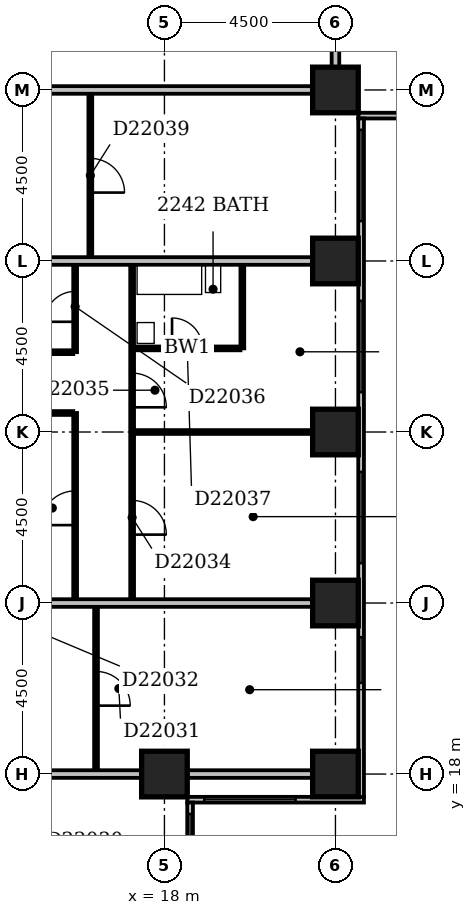
"""IFC4 building model, lengths in metres.
Left out: names, types, materials, properties, quantities, classifications, styles, units other than length and angle.
Written with IfcOpenShell. Run it as: python <this file> out.ifc"""

import sys

from ifc_helpers import new_model, si_unit, direction, frame, frame_2d, origin, origin_2d, place, context, subcontext, project, spatial, rectangle, extrude, element, fill, save


model = new_model("IFC4")
c1 = context("Model", 3, precision=1e-05, world=origin(), true_north=direction((0.0, 1.0)))
c2 = subcontext(c1, "Body", "Model", "MODEL_VIEW")
j1 = project(units=[si_unit("LENGTHUNIT", "METRE"), si_unit("PLANEANGLEUNIT", "RADIAN")], contexts=[c1])
p1 = place(None, origin())
s1 = spatial("IfcSite", under=j1, at=p1, CompositionType="ELEMENT")
p2 = place(p1, origin())
s2 = spatial("IfcBuilding", under=s1, at=p2, CompositionType="ELEMENT")
p3 = place(p2, frame((0.0, 0.0, 90.2)))
s3 = spatial("IfcBuildingStorey", under=s2, at=p3, CompositionType="ELEMENT", Elevation=90.2)
for number, where, z_axis, x_axis in (
    (1, (18.0, 18.0, -0.3), (0.0, 0.0, 1.0), (1.0, 0.0, 0.0)),
    (2, (22.5, 18.0, -0.3), (0.0, 0.0, 1.0), (1.0, 0.0, 0.0)),
    (3, (22.5, 22.5, -0.3), (0.0, 0.0, 1.0), (1.0, 0.0, 0.0)),
    (4, (22.5, 27.0, -0.3), (0.0, 0.0, 1.0), (1.0, 0.0, 0.0)),
    (5, (22.5, 31.5, -0.3), (0.0, 0.0, 1.0), (1.0, 0.0, 0.0)),
    (6, (22.5, 36.0, -0.3), (0.0, 0.0, 1.0), (1.0, 0.0, 0.0)),
):
    element("IfcColumn", number, at=place(p3, frame(where, z_axis=z_axis, x_axis=x_axis)), inside=s3, PredefinedType="COLUMN", context=c2, shape_type="SweptSolid", body=[
        extrude(rectangle(XDim=1.2, YDim=1.2, at=origin_2d()), origin(), (0.0, 0.0, 1.0), 3.6),
    ])
p4 = place(p3, frame((18.675, 8.4, 0.0), z_axis=(0.0, 0.0, 1.0), x_axis=(0.0, 1.0, 0.0)))
e7 = element("IfcWall", 7, at=p4, inside=s3, PredefinedType="STANDARD", context=c2, shape_type="SweptSolid", body=[
    extrude(rectangle(XDim=8.85, YDim=0.15, at=frame_2d((4.425, 0.0))), origin(), (0.0, 0.0, 1.0), 2.7),
])
p5 = place(p4, frame((1.864, 0.0, 0.6)))
e8 = element("IfcOpeningElement", 8, at=p5, cuts=e7, PredefinedType="OPENING", context=c2, shape_type="SweptSolid", body=[
    extrude(rectangle(XDim=2.4, YDim=1.8, at=frame_2d((1.2, 0.9))), frame((0.0, 0.087, 0.0), z_axis=(0.0, -1.0, 0.0), x_axis=(1.0, 0.0, 0.0)), (0.0, 0.0, 1.0), 0.174),
])
p6 = place(p4, frame((6.15, 0.0, 0.6)))
e9 = element("IfcOpeningElement", 9, at=p6, cuts=e7, PredefinedType="OPENING", context=c2, shape_type="SweptSolid", body=[
    extrude(rectangle(XDim=2.4, YDim=1.8, at=frame_2d((1.2, 0.9))), frame((0.0, 0.087, 0.0), z_axis=(0.0, -1.0, 0.0), x_axis=(1.0, 0.0, 0.0)), (0.0, 0.0, 1.0), 0.174),
])
p7 = place(p3, frame((18.6, 17.325, 0.0), z_axis=(0.0, 0.0, 1.0), x_axis=(1.0, 0.0, 0.0)))
e10 = element("IfcWall", 10, at=p7, inside=s3, PredefinedType="STANDARD", context=c2, shape_type="SweptSolid", body=[
    extrude(rectangle(XDim=4.65, YDim=0.15, at=frame_2d((2.325, 0.0))), origin(), (0.0, 0.0, 1.0), 2.7),
])
p8 = place(p7, frame((0.45, 0.0, 0.6)))
e11 = element("IfcOpeningElement", 11, at=p8, cuts=e10, PredefinedType="OPENING", context=c2, shape_type="SweptSolid", body=[
    extrude(rectangle(XDim=2.4, YDim=1.8, at=frame_2d((1.2, 0.9))), frame((0.0, 0.087, 0.0), z_axis=(0.0, -1.0, 0.0), x_axis=(1.0, 0.0, 0.0)), (0.0, 0.0, 1.0), 0.174),
])
p9 = place(p3, frame((23.175, 17.4, 0.0), z_axis=(0.0, 0.0, 1.0), x_axis=(0.0, 1.0, 0.0)))
e12 = element("IfcWall", 12, at=p9, inside=s3, PredefinedType="STANDARD", context=c2, shape_type="SweptSolid", body=[
    extrude(rectangle(XDim=17.85, YDim=0.15, at=frame_2d((8.925, 0.0))), origin(), (0.0, 0.0, 1.0), 2.7),
])
p10 = place(p9, frame((3.0, 0.0, 0.6)))
e13 = element("IfcOpeningElement", 13, at=p10, cuts=e12, PredefinedType="OPENING", context=c2, shape_type="SweptSolid", body=[
    extrude(rectangle(XDim=1.2, YDim=1.8, at=frame_2d((0.6, 0.9))), frame((0.0, 0.087, 0.0), z_axis=(0.0, -1.0, 0.0), x_axis=(1.0, 0.0, 0.0)), (0.0, 0.0, 1.0), 0.174),
])
p11 = place(p9, frame((6.15, 0.0, 0.6)))
e14 = element("IfcOpeningElement", 14, at=p11, cuts=e12, PredefinedType="OPENING", context=c2, shape_type="SweptSolid", body=[
    extrude(rectangle(XDim=2.4, YDim=1.8, at=frame_2d((1.2, 0.9))), frame((0.0, 0.087, 0.0), z_axis=(0.0, -1.0, 0.0), x_axis=(1.0, 0.0, 0.0)), (0.0, 0.0, 1.0), 0.174),
])
p12 = place(p9, frame((10.65, 0.0, 0.6)))
e15 = element("IfcOpeningElement", 15, at=p12, cuts=e12, PredefinedType="OPENING", context=c2, shape_type="SweptSolid", body=[
    extrude(rectangle(XDim=2.4, YDim=1.8, at=frame_2d((1.2, 0.9))), frame((0.0, 0.087, 0.0), z_axis=(0.0, -1.0, 0.0), x_axis=(1.0, 0.0, 0.0)), (0.0, 0.0, 1.0), 0.174),
])
p13 = place(p9, frame((15.15, 0.0, 0.6)))
e16 = element("IfcOpeningElement", 16, at=p13, cuts=e12, PredefinedType="OPENING", context=c2, shape_type="SweptSolid", body=[
    extrude(rectangle(XDim=2.4, YDim=1.8, at=frame_2d((1.2, 0.9))), frame((0.0, 0.087, 0.0), z_axis=(0.0, -1.0, 0.0), x_axis=(1.0, 0.0, 0.0)), (0.0, 0.0, 1.0), 0.174),
])
p14 = place(p3, frame((23.1, 35.325, 0.0), z_axis=(0.0, 0.0, 1.0), x_axis=(1.0, 0.0, 0.0)))
e17 = element("IfcWall", 17, at=p14, inside=s3, PredefinedType="STANDARD", context=c2, shape_type="SweptSolid", body=[
    extrude(rectangle(XDim=45.15, YDim=0.15, at=frame_2d((22.575, 0.0))), origin(), (0.0, 0.0, 1.0), 2.7),
])
p15 = place(p14, frame((2.185, 0.0, 0.6)))
e18 = element("IfcOpeningElement", 18, at=p15, cuts=e17, PredefinedType="OPENING", context=c2, shape_type="SweptSolid", body=[
    extrude(rectangle(XDim=0.9, YDim=1.8, at=frame_2d((0.45, 0.9))), frame((0.0, 0.087, 0.0), z_axis=(0.0, -1.0, 0.0), x_axis=(1.0, 0.0, 0.0)), (0.0, 0.0, 1.0), 0.174),
])
p16 = place(p14, frame((4.95, 0.0, 0.6)))
e19 = element("IfcOpeningElement", 19, at=p16, cuts=e17, PredefinedType="OPENING", context=c2, shape_type="SweptSolid", body=[
    extrude(rectangle(XDim=2.4, YDim=1.8, at=frame_2d((1.2, 0.9))), frame((0.0, 0.087, 0.0), z_axis=(0.0, -1.0, 0.0), x_axis=(1.0, 0.0, 0.0)), (0.0, 0.0, 1.0), 0.174),
])
p17 = place(p14, frame((9.45, 0.0, 0.6)))
e20 = element("IfcOpeningElement", 20, at=p17, cuts=e17, PredefinedType="OPENING", context=c2, shape_type="SweptSolid", body=[
    extrude(rectangle(XDim=2.4, YDim=1.8, at=frame_2d((1.2, 0.9))), frame((0.0, 0.087, 0.0), z_axis=(0.0, -1.0, 0.0), x_axis=(1.0, 0.0, 0.0)), (0.0, 0.0, 1.0), 0.174),
])
p18 = place(p14, frame((13.95, 0.0, 0.6)))
e21 = element("IfcOpeningElement", 21, at=p18, cuts=e17, PredefinedType="OPENING", context=c2, shape_type="SweptSolid", body=[
    extrude(rectangle(XDim=2.4, YDim=1.8, at=frame_2d((1.2, 0.9))), frame((0.0, 0.087, 0.0), z_axis=(0.0, -1.0, 0.0), x_axis=(1.0, 0.0, 0.0)), (0.0, 0.0, 1.0), 0.174),
])
p19 = place(p14, frame((18.45, 0.0, 0.6)))
e22 = element("IfcOpeningElement", 22, at=p19, cuts=e17, PredefinedType="OPENING", context=c2, shape_type="SweptSolid", body=[
    extrude(rectangle(XDim=2.4, YDim=1.8, at=frame_2d((1.2, 0.9))), frame((0.0, 0.087, 0.0), z_axis=(0.0, -1.0, 0.0), x_axis=(1.0, 0.0, 0.0)), (0.0, 0.0, 1.0), 0.174),
])
p20 = place(p14, frame((22.71, 0.0, 0.6)))
e23 = element("IfcOpeningElement", 23, at=p20, cuts=e17, PredefinedType="OPENING", context=c2, shape_type="SweptSolid", body=[
    extrude(rectangle(XDim=1.8, YDim=1.8, at=frame_2d((0.9, 0.9))), frame((0.0, 0.087, 0.0), z_axis=(0.0, -1.0, 0.0), x_axis=(1.0, 0.0, 0.0)), (0.0, 0.0, 1.0), 0.174),
])
p21 = place(p14, frame((28.861, 0.0, 0.6)))
e24 = element("IfcOpeningElement", 24, at=p21, cuts=e17, PredefinedType="OPENING", context=c2, shape_type="SweptSolid", body=[
    extrude(rectangle(XDim=1.2, YDim=1.8, at=frame_2d((0.6, 0.9))), frame((0.0, 0.087, 0.0), z_axis=(0.0, -1.0, 0.0), x_axis=(1.0, 0.0, 0.0)), (0.0, 0.0, 1.0), 0.174),
])
p22 = place(p14, frame((31.95, 0.0, 0.6)))
e25 = element("IfcOpeningElement", 25, at=p22, cuts=e17, PredefinedType="OPENING", context=c2, shape_type="SweptSolid", body=[
    extrude(rectangle(XDim=2.4, YDim=1.8, at=frame_2d((1.2, 0.9))), frame((0.0, 0.087, 0.0), z_axis=(0.0, -1.0, 0.0), x_axis=(1.0, 0.0, 0.0)), (0.0, 0.0, 1.0), 0.174),
])
p23 = place(p14, frame((36.45, 0.0, 0.6)))
e26 = element("IfcOpeningElement", 26, at=p23, cuts=e17, PredefinedType="OPENING", context=c2, shape_type="SweptSolid", body=[
    extrude(rectangle(XDim=2.4, YDim=1.8, at=frame_2d((1.2, 0.9))), frame((0.0, 0.087, 0.0), z_axis=(0.0, -1.0, 0.0), x_axis=(1.0, 0.0, 0.0)), (0.0, 0.0, 1.0), 0.174),
])
p24 = place(p14, frame((40.95, 0.0, 0.6)))
e27 = element("IfcOpeningElement", 27, at=p24, cuts=e17, PredefinedType="OPENING", context=c2, shape_type="SweptSolid", body=[
    extrude(rectangle(XDim=2.4, YDim=1.8, at=frame_2d((1.2, 0.9))), frame((0.0, 0.087, 0.0), z_axis=(0.0, -1.0, 0.0), x_axis=(1.0, 0.0, 0.0)), (0.0, 0.0, 1.0), 0.174),
])
p25 = place(p3, frame((9.1, 18.0, 0.0), z_axis=(0.0, 0.0, 1.0), x_axis=(1.0, 0.0, 0.0)))
e28 = element("IfcWall", 28, at=p25, inside=s3, PredefinedType="PARTITIONING", context=c2, shape_type="SweptSolid", body=[
    extrude(rectangle(XDim=8.3, YDim=0.2, at=frame_2d((4.15, 0.0))), origin(), (0.0, 0.0, 1.0), 2.6),
])
p26 = place(p3, frame((18.6, 18.0, 0.0), z_axis=(0.0, 0.0, 1.0), x_axis=(1.0, 0.0, 0.0)))
e29 = element("IfcWall", 29, at=p26, inside=s3, PredefinedType="PARTITIONING", context=c2, shape_type="SweptSolid", body=[
    extrude(rectangle(XDim=3.3, YDim=0.2, at=frame_2d((1.65, 0.0))), origin(), (0.0, 0.0, 1.0), 2.7),
])
p27 = place(p3, frame((16.2, 18.1, 0.0), z_axis=(0.0, 0.0, 1.0), x_axis=(0.0, 1.0, 0.0)))
e30 = element("IfcWall", 30, at=p27, inside=s3, PredefinedType="PARTITIONING", context=c2, shape_type="SweptSolid", body=[
    extrude(rectangle(XDim=4.3, YDim=0.1, at=frame_2d((2.15, 0.0))), origin(), (0.0, 0.0, 1.0), 3.3),
])
p28 = place(p27, frame((1.7, 0.0, 0.0)))
e31 = element("IfcOpeningElement", 31, at=p28, cuts=e30, PredefinedType="OPENING", context=c2, shape_type="SweptSolid", body=[
    extrude(rectangle(XDim=0.9, YDim=2.1, at=frame_2d((0.45, 1.05))), frame((0.0, 0.062, 0.0), z_axis=(0.0, -1.0, 0.0), x_axis=(1.0, 0.0, 0.0)), (0.0, 0.0, 1.0), 0.124),
])
p29 = place(p3, frame((9.1, 22.5, 0.0), z_axis=(0.0, 0.0, 1.0), x_axis=(1.0, 0.0, 0.0)))
e32 = element("IfcWall", 32, at=p29, inside=s3, PredefinedType="PARTITIONING", context=c2, shape_type="SweptSolid", body=[
    extrude(rectangle(XDim=12.8, YDim=0.2, at=frame_2d((6.4, 0.0))), origin(), (0.0, 0.0, 1.0), 3.3),
])
p30 = place(p3, frame((15.65, 22.6, 0.0), z_axis=(0.0, 0.0, 1.0), x_axis=(0.0, 1.0, 0.0)))
e33 = element("IfcWall", 33, at=p30, inside=s3, PredefinedType="PARTITIONING", context=c2, shape_type="SweptSolid", body=[
    extrude(rectangle(XDim=4.9, YDim=0.1, at=frame_2d((2.45, 0.0))), origin(), (0.0, 0.0, 1.0), 3.3),
])
p31 = place(p30, frame((1.95, 0.0, 0.0)))
e34 = element("IfcOpeningElement", 34, at=p31, cuts=e33, PredefinedType="OPENING", context=c2, shape_type="SweptSolid", body=[
    extrude(rectangle(XDim=0.9, YDim=2.1, at=frame_2d((0.45, 1.05))), frame((0.0, 0.062, 0.0), z_axis=(0.0, -1.0, 0.0), x_axis=(1.0, 0.0, 0.0)), (0.0, 0.0, 1.0), 0.124),
])
p32 = place(p3, frame((17.15, 22.6, 0.0), z_axis=(0.0, 0.0, 1.0), x_axis=(0.0, 1.0, 0.0)))
e35 = element("IfcWall", 35, at=p32, inside=s3, PredefinedType="PARTITIONING", context=c2, shape_type="SweptSolid", body=[
    extrude(rectangle(XDim=8.8, YDim=0.1, at=frame_2d((4.4, 0.0))), origin(), (0.0, 0.0, 1.0), 3.3),
])
p33 = place(p32, frame((1.7, 0.0, 0.0)))
e36 = element("IfcOpeningElement", 36, at=p33, cuts=e35, PredefinedType="OPENING", context=c2, shape_type="SweptSolid", body=[
    extrude(rectangle(XDim=0.9, YDim=2.1, at=frame_2d((0.45, 1.05))), frame((0.0, 0.062, 0.0), z_axis=(0.0, -1.0, 0.0), x_axis=(1.0, 0.0, 0.0)), (0.0, 0.0, 1.0), 0.124),
])
p34 = place(p32, frame((5.05, 0.0, 0.0)))
e37 = element("IfcOpeningElement", 37, at=p34, cuts=e35, PredefinedType="OPENING", context=c2, shape_type="SweptSolid", body=[
    extrude(rectangle(XDim=0.9, YDim=2.1, at=frame_2d((0.45, 1.05))), frame((0.0, 0.062, 0.0), z_axis=(0.0, -1.0, 0.0), x_axis=(1.0, 0.0, 0.0)), (0.0, 0.0, 1.0), 0.124),
])
p35 = place(p3, frame((17.2, 27.0, 0.0), z_axis=(0.0, 0.0, 1.0), x_axis=(1.0, 0.0, 0.0)))
e38 = element("IfcWall", 38, at=p35, inside=s3, PredefinedType="PARTITIONING", context=c2, shape_type="SweptSolid", body=[
    extrude(rectangle(XDim=4.7, YDim=0.1, at=frame_2d((2.35, 0.0))), origin(), (0.0, 0.0, 1.0), 2.7),
])
p36 = place(p3, frame((9.1, 27.5, 0.0), z_axis=(0.0, 0.0, 1.0), x_axis=(1.0, 0.0, 0.0)))
e39 = element("IfcWall", 39, at=p36, inside=s3, PredefinedType="PARTITIONING", context=c2, shape_type="SweptSolid", body=[
    extrude(rectangle(XDim=6.5, YDim=0.1, at=frame_2d((3.25, 0.0))), origin(), (0.0, 0.0, 1.0), 2.7),
])
p37 = place(p3, frame((9.1, 29.1, 0.0), z_axis=(0.0, 0.0, 1.0), x_axis=(1.0, 0.0, 0.0)))
e40 = element("IfcWall", 40, at=p37, inside=s3, PredefinedType="PLUMBINGWALL", context=c2, shape_type="SweptSolid", body=[
    extrude(rectangle(XDim=6.5, YDim=0.1, at=frame_2d((3.25, 0.0))), origin(), (0.0, 0.0, 1.0), 3.3),
])
p38 = place(p3, frame((15.65, 29.1, 0.0), z_axis=(0.0, 0.0, 1.0), x_axis=(0.0, 1.0, 0.0)))
e41 = element("IfcWall", 41, at=p38, inside=s3, PredefinedType="PARTITIONING", context=c2, shape_type="SweptSolid", body=[
    extrude(rectangle(XDim=2.3, YDim=0.1, at=frame_2d((1.15, 0.0))), origin(), (0.0, 0.0, 1.0), 3.3),
])
p39 = place(p38, frame((0.8, 0.0, 0.0)))
e42 = element("IfcOpeningElement", 42, at=p39, cuts=e41, PredefinedType="OPENING", context=c2, shape_type="SweptSolid", body=[
    extrude(rectangle(XDim=0.8, YDim=2.1, at=frame_2d((0.4, 1.05))), frame((0.0, 0.062, 0.0), z_axis=(0.0, -1.0, 0.0), x_axis=(1.0, 0.0, 0.0)), (0.0, 0.0, 1.0), 0.124),
])
p40 = place(p3, frame((17.2, 29.2, 0.0), z_axis=(0.0, 0.0, 1.0), x_axis=(1.0, 0.0, 0.0)))
e43 = element("IfcWall", 43, at=p40, inside=s3, PredefinedType="PLUMBINGWALL", context=c2, shape_type="SweptSolid", body=[
    extrude(rectangle(XDim=2.8, YDim=0.1, at=frame_2d((1.4, 0.0))), origin(), (0.0, 0.0, 1.0), 3.3),
])
p41 = place(p40, frame((1.0, 0.0, 0.0)))
e44 = element("IfcOpeningElement", 44, at=p41, cuts=e43, PredefinedType="OPENING", context=c2, shape_type="SweptSolid", body=[
    extrude(rectangle(XDim=0.8, YDim=2.1, at=frame_2d((0.4, 1.05))), frame((0.0, 0.062, 0.0), z_axis=(0.0, -1.0, 0.0), x_axis=(1.0, 0.0, 0.0)), (0.0, 0.0, 1.0), 0.124),
])
p42 = place(p3, frame((20.05, 29.2, 0.0), z_axis=(0.0, 0.0, 1.0), x_axis=(0.0, 1.0, 0.0)))
e45 = element("IfcWall", 45, at=p42, inside=s3, PredefinedType="PLUMBINGWALL", context=c2, shape_type="SweptSolid", body=[
    extrude(rectangle(XDim=2.2, YDim=0.1, at=frame_2d((1.1, 0.0))), origin(), (0.0, 0.0, 1.0), 3.3),
])
p43 = place(p3, frame((9.1, 31.5, 0.0), z_axis=(0.0, 0.0, 1.0), x_axis=(1.0, 0.0, 0.0)))
e46 = element("IfcWall", 46, at=p43, inside=s3, PredefinedType="PARTITIONING", context=c2, shape_type="SweptSolid", body=[
    extrude(rectangle(XDim=12.8, YDim=0.2, at=frame_2d((6.4, 0.0))), origin(), (0.0, 0.0, 1.0), 3.3),
])
p44 = place(p3, frame((16.05, 31.6, 0.0), z_axis=(0.0, 0.0, 1.0), x_axis=(0.0, 1.0, 0.0)))
e47 = element("IfcWall", 47, at=p44, inside=s3, PredefinedType="PARTITIONING", context=c2, shape_type="SweptSolid", body=[
    extrude(rectangle(XDim=4.3, YDim=0.1, at=frame_2d((2.15, 0.0))), origin(), (0.0, 0.0, 1.0), 3.3),
])
p45 = place(p44, frame((1.7, 0.0, 0.0)))
e48 = element("IfcOpeningElement", 48, at=p45, cuts=e47, PredefinedType="OPENING", context=c2, shape_type="SweptSolid", body=[
    extrude(rectangle(XDim=0.9, YDim=2.1, at=frame_2d((0.45, 1.05))), frame((0.0, 0.062, 0.0), z_axis=(0.0, -1.0, 0.0), x_axis=(1.0, 0.0, 0.0)), (0.0, 0.0, 1.0), 0.124),
])
p46 = place(p3, frame((9.1, 36.0, 0.0), z_axis=(0.0, 0.0, 1.0), x_axis=(1.0, 0.0, 0.0)))
e49 = element("IfcWall", 49, at=p46, inside=s3, PredefinedType="PARTITIONING", context=c2, shape_type="SweptSolid", body=[
    extrude(rectangle(XDim=12.8, YDim=0.2, at=frame_2d((6.4, 0.0))), origin(), (0.0, 0.0, 1.0), 2.4),
])
p47 = place(p3, frame((22.5, 36.6, 0.0), z_axis=(0.0, 0.0, 1.0), x_axis=(0.0, 1.0, 0.0)))
e50 = element("IfcWall", 50, at=p47, inside=s3, PredefinedType="PARTITIONING", context=c2, shape_type="SweptSolid", body=[
    extrude(rectangle(XDim=12.8, YDim=0.2, at=frame_2d((6.4, 0.0))), origin(), (0.0, 0.0, 1.0), 3.3),
])
p48 = place(p6, origin())
e51 = element("IfcWindow", 51, at=p48, inside=s3, PartitioningType="SINGLE_PANEL", PredefinedType="WINDOW", context=c2, shape_type="SweptSolid", body=[
    extrude(rectangle(XDim=2.4, YDim=1.8, at=frame_2d((1.2, 0.9))), frame((0.0, 0.03, 0.0), z_axis=(0.0, -1.0, 0.0), x_axis=(1.0, 0.0, 0.0)), (0.0, 0.0, 1.0), 0.06),
])
fill(e9, e51)
p49 = place(p8, origin())
e52 = element("IfcWindow", 52, at=p49, inside=s3, PartitioningType="SINGLE_PANEL", PredefinedType="WINDOW", context=c2, shape_type="SweptSolid", body=[
    extrude(rectangle(XDim=2.4, YDim=1.8, at=frame_2d((1.2, 0.9))), frame((0.0, 0.03, 0.0), z_axis=(0.0, -1.0, 0.0), x_axis=(1.0, 0.0, 0.0)), (0.0, 0.0, 1.0), 0.06),
])
fill(e11, e52)
p50 = place(p10, origin())
e53 = element("IfcWindow", 53, at=p50, inside=s3, PartitioningType="SINGLE_PANEL", PredefinedType="WINDOW", context=c2, shape_type="SweptSolid", body=[
    extrude(rectangle(XDim=1.2, YDim=1.8, at=frame_2d((0.6, 0.9))), frame((0.0, 0.03, 0.0), z_axis=(0.0, -1.0, 0.0), x_axis=(1.0, 0.0, 0.0)), (0.0, 0.0, 1.0), 0.06),
])
fill(e13, e53)
p51 = place(p11, origin())
e54 = element("IfcWindow", 54, at=p51, inside=s3, PartitioningType="SINGLE_PANEL", PredefinedType="WINDOW", context=c2, shape_type="SweptSolid", body=[
    extrude(rectangle(XDim=2.4, YDim=1.8, at=frame_2d((1.2, 0.9))), frame((0.0, 0.03, 0.0), z_axis=(0.0, -1.0, 0.0), x_axis=(1.0, 0.0, 0.0)), (0.0, 0.0, 1.0), 0.06),
])
fill(e14, e54)
p52 = place(p12, origin())
e55 = element("IfcWindow", 55, at=p52, inside=s3, PartitioningType="SINGLE_PANEL", PredefinedType="WINDOW", context=c2, shape_type="SweptSolid", body=[
    extrude(rectangle(XDim=2.4, YDim=1.8, at=frame_2d((1.2, 0.9))), frame((0.0, 0.03, 0.0), z_axis=(0.0, -1.0, 0.0), x_axis=(1.0, 0.0, 0.0)), (0.0, 0.0, 1.0), 0.06),
])
fill(e15, e55)
p53 = place(p13, origin())
e56 = element("IfcWindow", 56, at=p53, inside=s3, PartitioningType="SINGLE_PANEL", PredefinedType="WINDOW", context=c2, shape_type="SweptSolid", body=[
    extrude(rectangle(XDim=2.4, YDim=1.8, at=frame_2d((1.2, 0.9))), frame((0.0, 0.03, 0.0), z_axis=(0.0, -1.0, 0.0), x_axis=(1.0, 0.0, 0.0)), (0.0, 0.0, 1.0), 0.06),
])
fill(e16, e56)
p54 = place(p28, frame((0.9, 0.0, 0.0), z_axis=(0.0, 0.0, 1.0), x_axis=(-1.0, 0.0, 0.0)))
e57 = element("IfcDoor", 57, at=p54, inside=s3, OperationType="SINGLE_SWING_RIGHT", PredefinedType="DOOR", context=c2, shape_type="SweptSolid", body=[
    extrude(rectangle(XDim=0.9, YDim=2.1, at=frame_2d((0.45, 1.05))), frame((0.0, 0.025, 0.0), z_axis=(0.0, -1.0, 0.0), x_axis=(1.0, 0.0, 0.0)), (0.0, 0.0, 1.0), 0.05),
])
fill(e31, e57)
p55 = place(p31, origin())
e58 = element("IfcDoor", 58, at=p55, inside=s3, OperationType="SINGLE_SWING_LEFT", PredefinedType="DOOR", context=c2, shape_type="SweptSolid", body=[
    extrude(rectangle(XDim=0.9, YDim=2.1, at=frame_2d((0.45, 1.05))), frame((0.0, 0.025, 0.0), z_axis=(0.0, -1.0, 0.0), x_axis=(1.0, 0.0, 0.0)), (0.0, 0.0, 1.0), 0.05),
])
fill(e34, e58)
p56 = place(p33, frame((0.9, 0.0, 0.0), z_axis=(0.0, 0.0, 1.0), x_axis=(-1.0, 0.0, 0.0)))
e59 = element("IfcDoor", 59, at=p56, inside=s3, OperationType="SINGLE_SWING_RIGHT", PredefinedType="DOOR", context=c2, shape_type="SweptSolid", body=[
    extrude(rectangle(XDim=0.9, YDim=2.1, at=frame_2d((0.45, 1.05))), frame((0.0, 0.025, 0.0), z_axis=(0.0, -1.0, 0.0), x_axis=(1.0, 0.0, 0.0)), (0.0, 0.0, 1.0), 0.05),
])
fill(e36, e59)
p57 = place(p34, frame((0.9, 0.0, 0.0), z_axis=(0.0, 0.0, 1.0), x_axis=(-1.0, 0.0, 0.0)))
e60 = element("IfcDoor", 60, at=p57, inside=s3, OperationType="SINGLE_SWING_RIGHT", PredefinedType="DOOR", context=c2, shape_type="SweptSolid", body=[
    extrude(rectangle(XDim=0.9, YDim=2.1, at=frame_2d((0.45, 1.05))), frame((0.0, 0.025, 0.0), z_axis=(0.0, -1.0, 0.0), x_axis=(1.0, 0.0, 0.0)), (0.0, 0.0, 1.0), 0.05),
])
fill(e37, e60)
p58 = place(p39, origin())
e61 = element("IfcDoor", 61, at=p58, inside=s3, OperationType="SINGLE_SWING_LEFT", PredefinedType="DOOR", context=c2, shape_type="SweptSolid", body=[
    extrude(rectangle(XDim=0.8, YDim=2.1, at=frame_2d((0.4, 1.05))), frame((0.0, 0.025, 0.0), z_axis=(0.0, -1.0, 0.0), x_axis=(1.0, 0.0, 0.0)), (0.0, 0.0, 1.0), 0.05),
])
fill(e42, e61)
p59 = place(p41, origin())
e62 = element("IfcDoor", 62, at=p59, inside=s3, OperationType="SINGLE_SWING_LEFT", PredefinedType="DOOR", context=c2, shape_type="SweptSolid", body=[
    extrude(rectangle(XDim=0.8, YDim=2.1, at=frame_2d((0.4, 1.05))), frame((0.0, 0.025, 0.0), z_axis=(0.0, -1.0, 0.0), x_axis=(1.0, 0.0, 0.0)), (0.0, 0.0, 1.0), 0.05),
])
fill(e44, e62)
p60 = place(p45, frame((0.9, 0.0, 0.0), z_axis=(0.0, 0.0, 1.0), x_axis=(-1.0, 0.0, 0.0)))
e63 = element("IfcDoor", 63, at=p60, inside=s3, OperationType="SINGLE_SWING_RIGHT", PredefinedType="DOOR", context=c2, shape_type="SweptSolid", body=[
    extrude(rectangle(XDim=0.9, YDim=2.1, at=frame_2d((0.45, 1.05))), frame((0.0, 0.025, 0.0), z_axis=(0.0, -1.0, 0.0), x_axis=(1.0, 0.0, 0.0)), (0.0, 0.0, 1.0), 0.05),
])
fill(e48, e63)
save(model, sys.argv[1])
